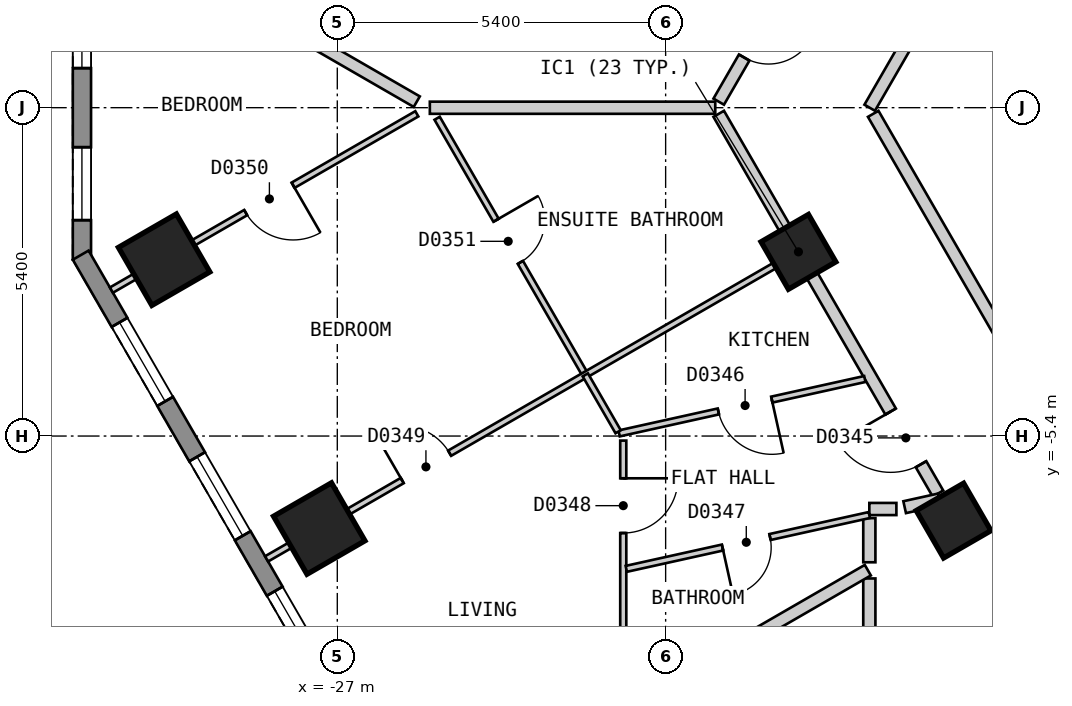
"""IFC4 building model, lengths in metres.
Left out: names, types, materials, properties, quantities, classifications, styles, units other than length and angle.
Written with IfcOpenShell. Run it as: python <this file> out.ifc"""

import sys

from ifc_helpers import new_model, si_unit, direction, frame, frame_2d, origin, origin_2d, place, context, subcontext, project, spatial, polyline, rectangle, outline, extrude, element, fill, save


model = new_model("IFC4")
c1 = context("Model", 3, precision=1e-05, world=origin(), true_north=direction((0.0, 1.0)))
c2 = subcontext(c1, "Body", "Model", "MODEL_VIEW")
j1 = project(units=[si_unit("LENGTHUNIT", "METRE"), si_unit("PLANEANGLEUNIT", "RADIAN")], contexts=[c1])
p1 = place(None, origin())
s1 = spatial("IfcSite", under=j1, at=p1, CompositionType="ELEMENT")
p2 = place(p1, origin())
s2 = spatial("IfcBuilding", under=s1, at=p2, CompositionType="ELEMENT")
p3 = place(p2, frame((0.0, 0.0, 59.4)))
s3 = spatial("IfcBuildingStorey", under=s2, at=p3, CompositionType="ELEMENT", Elevation=59.4)
for number, where, z_axis, x_axis in (
    (1, (-29.848, -2.5, 0.0), (0.0, 0.0, 1.0), (0.5, -0.866, 0.0)),
    (2, (-27.297, -6.921, 0.0), (0.0, 0.0, 1.0), (0.5, -0.866, 0.0)),
):
    element("IfcColumn", number, at=place(p3, frame(where, z_axis=z_axis, x_axis=x_axis)), inside=s3, PredefinedType="COLUMN", context=c2, shape_type="SweptSolid", body=[
        extrude(rectangle(XDim=1.1, YDim=1.1, at=origin_2d()), origin(), (0.0, 0.0, 1.0), 3.0),
    ])
for number, where, z_axis, x_axis in (
    (3, (-19.416, -2.371, 0.0), (0.0, 0.0, 1.0), (0.5, -0.866, 0.0)),
    (4, (-16.864, -6.791, 0.0), (0.0, 0.0, 1.0), (0.5, -0.866, 0.0)),
):
    element("IfcColumn", number, at=place(p3, frame(where, z_axis=z_axis, x_axis=x_axis)), inside=s3, PredefinedType="COLUMN", context=c2, shape_type="SweptSolid", body=[
        extrude(rectangle(XDim=0.9, YDim=0.9, at=origin_2d()), origin(), (0.0, 0.0, 1.0), 3.0),
    ])
p4 = place(p3, frame((-31.2, 2.5, 0.0), z_axis=(0.0, 0.0, 1.0), x_axis=(0.0, -1.0, 0.0)))
e5 = element("IfcWall", 5, at=p4, inside=s3, PredefinedType="SOLIDWALL", context=c2, shape_type="SweptSolid", body=[
    extrude(outline(polyline([(0.0, -0.15), (5.0, -0.15), (4.92, 0.15), (0.08, 0.15), (0.0, -0.15)])), origin(), (0.0, 0.0, 1.0), 2.6),
])
p5 = place(p4, frame((0.65, 0.0, 0.15)))
e6 = element("IfcOpeningElement", 6, at=p5, cuts=e5, PredefinedType="OPENING", context=c2, shape_type="SweptSolid", body=[
    extrude(rectangle(XDim=1.2, YDim=2.1, at=frame_2d((0.6, 1.05))), frame((0.0, 0.16, 0.0), z_axis=(0.0, -1.0, 0.0), x_axis=(1.0, 0.0, 0.0)), (0.0, 0.0, 1.0), 0.32),
])
p6 = place(p4, frame((3.15, 0.0, 0.15)))
e7 = element("IfcOpeningElement", 7, at=p6, cuts=e5, PredefinedType="OPENING", context=c2, shape_type="SweptSolid", body=[
    extrude(rectangle(XDim=1.2, YDim=2.1, at=frame_2d((0.6, 1.05))), frame((0.0, 0.16, 0.0), z_axis=(0.0, -1.0, 0.0), x_axis=(1.0, 0.0, 0.0)), (0.0, 0.0, 1.0), 0.32),
])
p7 = place(p3, frame((-31.22, -2.425, 0.0), z_axis=(0.0, 0.0, 1.0), x_axis=(0.500001938803, -0.866024284413, 0.0)))
e8 = element("IfcWall", 8, at=p7, inside=s3, PredefinedType="SOLIDWALL", context=c2, shape_type="SweptSolid", body=[
    extrude(outline(polyline([(0.0, -0.15), (27.02, -0.15), (26.94, 0.15), (0.08, 0.15), (0.0, -0.15)])), origin(), (0.0, 0.0, 1.0), 2.6),
])
p8 = place(p7, frame((1.277, 0.0, 0.15)))
e9 = element("IfcOpeningElement", 9, at=p8, cuts=e8, PredefinedType="OPENING", context=c2, shape_type="SweptSolid", body=[
    extrude(rectangle(XDim=1.5, YDim=2.1, at=frame_2d((0.75, 1.05))), frame((0.0, 0.16, 0.0), z_axis=(0.0, -1.0, 0.0), x_axis=(1.0, 0.0, 0.0)), (0.0, 0.0, 1.0), 0.32),
])
p9 = place(p7, frame((3.829, 0.0, 0.15)))
e10 = element("IfcOpeningElement", 10, at=p9, cuts=e8, PredefinedType="OPENING", context=c2, shape_type="SweptSolid", body=[
    extrude(rectangle(XDim=1.5, YDim=2.1, at=frame_2d((0.75, 1.05))), frame((0.0, 0.16, 0.0), z_axis=(0.0, -1.0, 0.0), x_axis=(1.0, 0.0, 0.0)), (0.0, 0.0, 1.0), 0.32),
])
p10 = place(p7, frame((6.382, 0.0, 0.15)))
e11 = element("IfcOpeningElement", 11, at=p10, cuts=e8, PredefinedType="OPENING", context=c2, shape_type="SweptSolid", body=[
    extrude(rectangle(XDim=1.5, YDim=2.1, at=frame_2d((0.75, 1.05))), frame((0.0, 0.16, 0.0), z_axis=(0.0, -1.0, 0.0), x_axis=(1.0, 0.0, 0.0)), (0.0, 0.0, 1.0), 0.32),
])
p11 = place(p7, frame((8.933, 0.0, 0.15)))
e12 = element("IfcOpeningElement", 12, at=p11, cuts=e8, PredefinedType="OPENING", context=c2, shape_type="SweptSolid", body=[
    extrude(rectangle(XDim=1.5, YDim=2.1, at=frame_2d((0.75, 1.05))), frame((0.0, 0.16, 0.0), z_axis=(0.0, -1.0, 0.0), x_axis=(1.0, 0.0, 0.0)), (0.0, 0.0, 1.0), 0.32),
])
p12 = place(p7, frame((11.485, 0.0, 0.15)))
e13 = element("IfcOpeningElement", 13, at=p12, cuts=e8, PredefinedType="OPENING", context=c2, shape_type="SweptSolid", body=[
    extrude(rectangle(XDim=1.5, YDim=2.1, at=frame_2d((0.75, 1.05))), frame((0.0, 0.16, 0.0), z_axis=(0.0, -1.0, 0.0), x_axis=(1.0, 0.0, 0.0)), (0.0, 0.0, 1.0), 0.32),
])
p13 = place(p7, frame((14.037, 0.0, 0.15)))
e14 = element("IfcOpeningElement", 14, at=p13, cuts=e8, PredefinedType="OPENING", context=c2, shape_type="SweptSolid", body=[
    extrude(rectangle(XDim=1.5, YDim=2.1, at=frame_2d((0.75, 1.05))), frame((0.0, 0.16, 0.0), z_axis=(0.0, -1.0, 0.0), x_axis=(1.0, 0.0, 0.0)), (0.0, 0.0, 1.0), 0.32),
])
p14 = place(p7, frame((16.589, 0.0, 0.15)))
e15 = element("IfcOpeningElement", 15, at=p14, cuts=e8, PredefinedType="OPENING", context=c2, shape_type="SweptSolid", body=[
    extrude(rectangle(XDim=1.5, YDim=2.1, at=frame_2d((0.75, 1.05))), frame((0.0, 0.16, 0.0), z_axis=(0.0, -1.0, 0.0), x_axis=(1.0, 0.0, 0.0)), (0.0, 0.0, 1.0), 0.32),
])
p15 = place(p7, frame((19.141, 0.0, 0.15)))
e16 = element("IfcOpeningElement", 16, at=p15, cuts=e8, PredefinedType="OPENING", context=c2, shape_type="SweptSolid", body=[
    extrude(rectangle(XDim=1.5, YDim=2.1, at=frame_2d((0.75, 1.05))), frame((0.0, 0.16, 0.0), z_axis=(0.0, -1.0, 0.0), x_axis=(1.0, 0.0, 0.0)), (0.0, 0.0, 1.0), 0.32),
])
p16 = place(p7, frame((21.693, 0.0, 0.15)))
e17 = element("IfcOpeningElement", 17, at=p16, cuts=e8, PredefinedType="OPENING", context=c2, shape_type="SweptSolid", body=[
    extrude(rectangle(XDim=1.5, YDim=2.1, at=frame_2d((0.75, 1.05))), frame((0.0, 0.16, 0.0), z_axis=(0.0, -1.0, 0.0), x_axis=(1.0, 0.0, 0.0)), (0.0, 0.0, 1.0), 0.32),
])
p17 = place(p7, frame((24.244, 0.0, 0.15)))
e18 = element("IfcOpeningElement", 18, at=p17, cuts=e8, PredefinedType="OPENING", context=c2, shape_type="SweptSolid", body=[
    extrude(rectangle(XDim=1.5, YDim=2.1, at=frame_2d((0.75, 1.05))), frame((0.0, 0.16, 0.0), z_axis=(0.0, -1.0, 0.0), x_axis=(1.0, 0.0, 0.0)), (0.0, 0.0, 1.0), 0.32),
])
p18 = place(p3, frame((-18.186, -0.101, 0.0), z_axis=(0.0, 0.0, 1.0), x_axis=(0.499997591167, -0.86602679452, 0.0)))
e19 = element("IfcWall", 19, at=p18, inside=s3, PredefinedType="PARTITIONING", context=c2, shape_type="SweptSolid", body=[
    extrude(rectangle(XDim=5.172, YDim=0.2, at=frame_2d((2.586, 0.0))), origin(), (0.0, 0.0, 1.0), 2.6),
])
p19 = place(p3, frame((-20.727, -0.101, 0.0), z_axis=(0.0, 0.0, 1.0), x_axis=(0.500049702773, -0.865996705973, 0.0)))
e20 = element("IfcWall", 20, at=p19, inside=s3, PredefinedType="PARTITIONING", context=c2, shape_type="SweptSolid", body=[
    extrude(rectangle(XDim=7.211, YDim=0.2, at=frame_2d((3.605, 0.0))), origin(), (0.0, 0.0, 1.0), 2.6),
])
p20 = place(p19, frame((5.654, 0.0, 0.0)))
e21 = element("IfcOpeningElement", 21, at=p20, cuts=e20, PredefinedType="OPENING", context=c2, shape_type="SweptSolid", body=[
    extrude(rectangle(XDim=1.0, YDim=2.1, at=frame_2d((0.5, 1.05))), frame((0.0, 0.11, 0.0), z_axis=(0.0, -1.0, 0.0), x_axis=(1.0, 0.0, 0.0)), (0.0, 0.0, 1.0), 0.22),
])
p21 = place(p3, frame((-18.25, -6.6, 0.0), z_axis=(0.0, 0.0, 1.0), x_axis=(1.0, 0.0, 0.0)))
e22 = element("IfcWall", 22, at=p21, inside=s3, PredefinedType="PARTITIONING", context=c2, shape_type="SweptSolid", body=[
    extrude(rectangle(XDim=0.445, YDim=0.2, at=frame_2d((0.223, 0.0))), origin(), (0.0, 0.0, 1.0), 2.6),
])
p22 = place(p3, frame((-18.244, -0.001, 0.0), z_axis=(0.0, 0.0, 1.0), x_axis=(0.499962999376, 0.866046765051, 0.0)))
e23 = element("IfcWall", 23, at=p22, inside=s3, PredefinedType="PARTITIONING", context=c2, shape_type="SweptSolid", body=[
    extrude(rectangle(XDim=18.245, YDim=0.2, at=frame_2d((9.123, 0.0))), origin(), (0.0, 0.0, 1.0), 2.6),
])
p23 = place(p22, frame((8.672, 0.0, 0.0)))
e24 = element("IfcOpeningElement", 24, at=p23, cuts=e23, PredefinedType="OPENING", context=c2, shape_type="SweptSolid", body=[
    extrude(rectangle(XDim=0.9, YDim=2.1, at=frame_2d((0.45, 1.05))), frame((0.0, 0.11, 0.0), z_axis=(0.0, -1.0, 0.0), x_axis=(1.0, 0.0, 0.0)), (0.0, 0.0, 1.0), 0.22),
])
p24 = place(p3, frame((-20.727, 0.099, 0.0), z_axis=(0.0, 0.0, 1.0), x_axis=(0.499993204491, 0.866029327138, 0.0)))
e25 = element("IfcWall", 25, at=p24, inside=s3, PredefinedType="PARTITIONING", context=c2, shape_type="SweptSolid", body=[
    extrude(rectangle(XDim=20.554, YDim=0.2, at=frame_2d((10.277, 0.0))), origin(), (0.0, 0.0, 1.0), 2.6),
])
p25 = place(p24, frame((14.88, 0.0, 0.0)))
e26 = element("IfcOpeningElement", 26, at=p25, cuts=e25, PredefinedType="OPENING", context=c2, shape_type="SweptSolid", body=[
    extrude(rectangle(XDim=1.0, YDim=2.1, at=frame_2d((0.5, 1.05))), frame((0.0, 0.11, 0.0), z_axis=(0.0, -1.0, 0.0), x_axis=(1.0, 0.0, 0.0)), (0.0, 0.0, 1.0), 0.22),
])
p26 = place(p24, frame((4.673, 0.0, 0.0)))
e27 = element("IfcOpeningElement", 27, at=p26, cuts=e25, PredefinedType="OPENING", context=c2, shape_type="SweptSolid", body=[
    extrude(rectangle(XDim=1.0, YDim=2.1, at=frame_2d((0.5, 1.05))), frame((0.0, 0.11, 0.0), z_axis=(0.0, -1.0, 0.0), x_axis=(1.0, 0.0, 0.0)), (0.0, 0.0, 1.0), 0.22),
])
p27 = place(p24, frame((0.838, 0.0, 0.0)))
e28 = element("IfcOpeningElement", 28, at=p27, cuts=e25, PredefinedType="OPENING", context=c2, shape_type="SweptSolid", body=[
    extrude(rectangle(XDim=0.8, YDim=2.1, at=frame_2d((0.4, 1.05))), frame((0.0, 0.11, 0.0), z_axis=(0.0, -1.0, 0.0), x_axis=(1.0, 0.0, 0.0)), (0.0, 0.0, 1.0), 0.22),
])
p28 = place(p3, frame((-18.25, -11.407, 0.0), z_axis=(0.0, 0.0, 1.0), x_axis=(0.0, 1.0, 0.0)))
e29 = element("IfcWall", 29, at=p28, inside=s3, PredefinedType="PARTITIONING", context=c2, shape_type="SweptSolid", body=[
    extrude(rectangle(XDim=3.665, YDim=0.2, at=frame_2d((1.833, 0.0))), origin(), (0.0, 0.0, 1.0), 2.6),
])
p29 = place(p28, frame((0.334, 0.0, 0.0)))
e30 = element("IfcOpeningElement", 30, at=p29, cuts=e29, PredefinedType="OPENING", context=c2, shape_type="SweptSolid", body=[
    extrude(rectangle(XDim=1.0, YDim=2.1, at=frame_2d((0.5, 1.05))), frame((0.0, 0.11, 0.0), z_axis=(0.0, -1.0, 0.0), x_axis=(1.0, 0.0, 0.0)), (0.0, 0.0, 1.0), 0.22),
])
p30 = place(p3, frame((-18.25, -7.476, 0.0), z_axis=(0.0, 0.0, 1.0), x_axis=(0.0, 1.0, 0.0)))
e31 = element("IfcWall", 31, at=p30, inside=s3, PredefinedType="PARTITIONING", context=c2, shape_type="SweptSolid", body=[
    extrude(rectangle(XDim=0.726, YDim=0.2, at=frame_2d((0.363, 0.0))), origin(), (0.0, 0.0, 1.0), 2.6),
])
p31 = place(p3, frame((-25.358, -0.174, 0.0), z_axis=(0.0, 0.0, 1.0), x_axis=(0.500093956194, -0.865971151354, 0.0)))
e32 = element("IfcWall", 32, at=p31, inside=s3, PredefinedType="PARTITIONING", context=c2, shape_type="SweptSolid", body=[
    extrude(rectangle(XDim=4.873, YDim=0.1, at=frame_2d((2.437, 0.0))), origin(), (0.0, 0.0, 1.0), 2.6),
])
p32 = place(p31, frame((1.937, 0.0, 0.0)))
e33 = element("IfcOpeningElement", 33, at=p32, cuts=e32, PredefinedType="OPENING", context=c2, shape_type="SweptSolid", body=[
    extrude(rectangle(XDim=0.8, YDim=2.1, at=frame_2d((0.4, 1.05))), frame((0.0, 0.06, 0.0), z_axis=(0.0, -1.0, 0.0), x_axis=(1.0, 0.0, 0.0)), (0.0, 0.0, 1.0), 0.12),
])
p33 = place(p3, frame((-22.297, -9.813, 0.0), z_axis=(0.0, 0.0, 1.0), x_axis=(0.0, 1.0, 0.0)))
e34 = element("IfcWall", 34, at=p33, inside=s3, PredefinedType="PARTITIONING", context=c2, shape_type="SweptSolid", body=[
    extrude(rectangle(XDim=4.338, YDim=0.1, at=frame_2d((2.169, 0.0))), origin(), (0.0, 0.0, 1.0), 2.6),
])
p34 = place(p33, frame((2.818, 0.0, 0.0)))
e35 = element("IfcOpeningElement", 35, at=p34, cuts=e34, PredefinedType="OPENING", context=c2, shape_type="SweptSolid", body=[
    extrude(rectangle(XDim=0.9, YDim=2.1, at=frame_2d((0.45, 1.05))), frame((0.0, 0.06, 0.0), z_axis=(0.0, -1.0, 0.0), x_axis=(1.0, 0.0, 0.0)), (0.0, 0.0, 1.0), 0.12),
])
p35 = place(p3, frame((-22.365, -5.357, 0.0), z_axis=(0.0, 0.0, 1.0), x_axis=(0.976339488582, 0.216243388421, 0.0)))
e36 = element("IfcWall", 36, at=p35, inside=s3, PredefinedType="PARTITIONING", context=c2, shape_type="SweptSolid", body=[
    extrude(rectangle(XDim=4.139, YDim=0.1, at=frame_2d((2.069, 0.0))), origin(), (0.0, 0.0, 1.0), 2.6),
])
p36 = place(p35, frame((1.672, 0.0, 0.0)))
e37 = element("IfcOpeningElement", 37, at=p36, cuts=e36, PredefinedType="OPENING", context=c2, shape_type="SweptSolid", body=[
    extrude(rectangle(XDim=0.9, YDim=2.1, at=frame_2d((0.45, 1.05))), frame((0.0, 0.06, 0.0), z_axis=(0.0, -1.0, 0.0), x_axis=(1.0, 0.0, 0.0)), (0.0, 0.0, 1.0), 0.12),
])
p37 = place(p3, frame((-22.247, -7.584, 0.0), z_axis=(0.0, 0.0, 1.0), x_axis=(0.97635375062, 0.216178985219, 0.0)))
e38 = element("IfcWall", 38, at=p37, inside=s3, PredefinedType="PARTITIONING", context=c2, shape_type="SweptSolid", body=[
    extrude(rectangle(XDim=4.094, YDim=0.1, at=frame_2d((2.047, 0.0))), origin(), (0.0, 0.0, 1.0), 2.6),
])
p38 = place(p37, frame((1.621, 0.0, 0.0)))
e39 = element("IfcOpeningElement", 39, at=p38, cuts=e38, PredefinedType="OPENING", context=c2, shape_type="SweptSolid", body=[
    extrude(rectangle(XDim=0.8, YDim=2.1, at=frame_2d((0.4, 1.05))), frame((0.0, 0.06, 0.0), z_axis=(0.0, -1.0, 0.0), x_axis=(1.0, 0.0, 0.0)), (0.0, 0.0, 1.0), 0.12),
])
p39 = place(p3, frame((-28.163, -7.42, 0.0), z_axis=(0.0, 0.0, 1.0), x_axis=(0.866065245018, 0.499930986609, 0.0)))
e40 = element("IfcWall", 40, at=p39, inside=s3, PredefinedType="PARTITIONING", context=c2, shape_type="SweptSolid", body=[
    extrude(rectangle(XDim=10.0, YDim=0.1, at=frame_2d((5.0, 0.0))), origin(), (0.0, 0.0, 1.0), 2.6),
])
p40 = place(p39, frame((2.576, 0.0, 0.0)))
e41 = element("IfcOpeningElement", 41, at=p40, cuts=e40, PredefinedType="OPENING", context=c2, shape_type="SweptSolid", body=[
    extrude(rectangle(XDim=0.9, YDim=2.1, at=frame_2d((0.45, 1.05))), frame((0.0, 0.06, 0.0), z_axis=(0.0, -1.0, 0.0), x_axis=(1.0, 0.0, 0.0)), (0.0, 0.0, 1.0), 0.12),
])
p41 = place(p3, frame((-30.715, -3.0, 0.0), z_axis=(0.0, 0.0, 1.0), x_axis=(0.866116197112, 0.49984270836, 0.0)))
e42 = element("IfcWall", 42, at=p41, inside=s3, PredefinedType="PARTITIONING", context=c2, shape_type="SweptSolid", body=[
    extrude(rectangle(XDim=5.8, YDim=0.1, at=frame_2d((2.9, 0.0))), origin(), (0.0, 0.0, 1.0), 2.6),
])
p42 = place(p41, frame((2.55, 0.0, 0.0)))
e43 = element("IfcOpeningElement", 43, at=p42, cuts=e42, PredefinedType="OPENING", context=c2, shape_type="SweptSolid", body=[
    extrude(rectangle(XDim=0.9, YDim=2.1, at=frame_2d((0.45, 1.05))), frame((0.0, 0.06, 0.0), z_axis=(0.0, -1.0, 0.0), x_axis=(1.0, 0.0, 0.0)), (0.0, 0.0, 1.0), 0.12),
])
p43 = place(p3, frame((-30.716, 2.999, 0.0), z_axis=(0.0, 0.0, 1.0), x_axis=(0.866032775405, -0.499987231761, 0.0)))
e44 = element("IfcWall", 44, at=p43, inside=s3, PredefinedType="PARTITIONING", context=c2, shape_type="SweptSolid", body=[
    extrude(rectangle(XDim=5.8, YDim=0.2, at=frame_2d((2.9, 0.0))), origin(), (0.0, 0.0, 1.0), 2.6),
])
p44 = place(p3, frame((-25.478, -0.001, 0.0), z_axis=(0.0, 0.0, 1.0), x_axis=(1.0, 0.0, 0.0)))
e45 = element("IfcWall", 45, at=p44, inside=s3, PredefinedType="PARTITIONING", context=c2, shape_type="SweptSolid", body=[
    extrude(rectangle(XDim=4.694, YDim=0.2, at=frame_2d((2.347, 0.0))), origin(), (0.0, 0.0, 1.0), 2.6),
])
p45 = place(p3, frame((-17.669, -6.57, 0.0), z_axis=(0.0, 0.0, 1.0), x_axis=(0.976422724526, 0.215867234728, 0.0)))
e46 = element("IfcWall", 46, at=p45, inside=s3, PredefinedType="PARTITIONING", context=c2, shape_type="SweptSolid", body=[
    extrude(rectangle(XDim=0.583, YDim=0.2, at=frame_2d((0.292, 0.0))), origin(), (0.0, 0.0, 1.0), 2.6),
])
p46 = place(p3, frame((-25.61, -11.841, 0.0), z_axis=(0.0, 0.0, 1.0), x_axis=(0.866019023803, 0.500011050288, 0.0)))
e47 = element("IfcWall", 47, at=p46, inside=s3, PredefinedType="PARTITIONING", context=c2, shape_type="SweptSolid", body=[
    extrude(rectangle(XDim=8.47, YDim=0.2, at=frame_2d((4.235, 0.0))), origin(), (0.0, 0.0, 1.0), 2.6),
])
p47 = place(p3, frame((-22.921, -4.394, 0.0), z_axis=(0.0, 0.0, 1.0), x_axis=(0.499565963512, -0.866275849889, 0.0)))
e48 = element("IfcWall", 48, at=p47, inside=s3, PredefinedType="PARTITIONING", context=c2, shape_type="SweptSolid", body=[
    extrude(rectangle(XDim=1.081, YDim=0.1, at=frame_2d((0.54, 0.0))), origin(), (0.0, 0.0, 1.0), 2.6),
])
p48 = place(p5, origin())
e49 = element("IfcWindow", 49, at=p48, inside=s3, PartitioningType="SINGLE_PANEL", PredefinedType="WINDOW", context=c2, shape_type="SweptSolid", body=[
    extrude(rectangle(XDim=1.2, YDim=2.1, at=frame_2d((0.6, 1.05))), frame((0.0, 0.03, 0.0), z_axis=(0.0, -1.0, 0.0), x_axis=(1.0, 0.0, 0.0)), (0.0, 0.0, 1.0), 0.06),
])
fill(e6, e49)
p49 = place(p6, origin())
e50 = element("IfcWindow", 50, at=p49, inside=s3, PartitioningType="SINGLE_PANEL", PredefinedType="WINDOW", context=c2, shape_type="SweptSolid", body=[
    extrude(rectangle(XDim=1.2, YDim=2.1, at=frame_2d((0.6, 1.05))), frame((0.0, 0.03, 0.0), z_axis=(0.0, -1.0, 0.0), x_axis=(1.0, 0.0, 0.0)), (0.0, 0.0, 1.0), 0.06),
])
fill(e7, e50)
p50 = place(p8, origin())
e51 = element("IfcWindow", 51, at=p50, inside=s3, PartitioningType="SINGLE_PANEL", PredefinedType="WINDOW", context=c2, shape_type="SweptSolid", body=[
    extrude(rectangle(XDim=1.5, YDim=2.1, at=frame_2d((0.75, 1.05))), frame((0.0, 0.03, 0.0), z_axis=(0.0, -1.0, 0.0), x_axis=(1.0, 0.0, 0.0)), (0.0, 0.0, 1.0), 0.06),
])
fill(e9, e51)
p51 = place(p9, origin())
e52 = element("IfcWindow", 52, at=p51, inside=s3, PartitioningType="SINGLE_PANEL", PredefinedType="WINDOW", context=c2, shape_type="SweptSolid", body=[
    extrude(rectangle(XDim=1.5, YDim=2.1, at=frame_2d((0.75, 1.05))), frame((0.0, 0.03, 0.0), z_axis=(0.0, -1.0, 0.0), x_axis=(1.0, 0.0, 0.0)), (0.0, 0.0, 1.0), 0.06),
])
fill(e10, e52)
p52 = place(p10, origin())
e53 = element("IfcWindow", 53, at=p52, inside=s3, PartitioningType="SINGLE_PANEL", PredefinedType="WINDOW", context=c2, shape_type="SweptSolid", body=[
    extrude(rectangle(XDim=1.5, YDim=2.1, at=frame_2d((0.75, 1.05))), frame((0.0, 0.03, 0.0), z_axis=(0.0, -1.0, 0.0), x_axis=(1.0, 0.0, 0.0)), (0.0, 0.0, 1.0), 0.06),
])
fill(e11, e53)
p53 = place(p27, origin())
e54 = element("IfcDoor", 54, at=p53, inside=s3, OperationType="SINGLE_SWING_RIGHT", PredefinedType="DOOR", context=c2, shape_type="SweptSolid", body=[
    extrude(rectangle(XDim=0.8, YDim=2.1, at=frame_2d((0.4, 1.05))), frame((0.0, 0.025, 0.0), z_axis=(0.0, -1.0, 0.0), x_axis=(1.0, 0.0, 0.0)), (0.0, 0.0, 1.0), 0.05),
])
fill(e28, e54)
p54 = place(p20, origin())
e55 = element("IfcDoor", 55, at=p54, inside=s3, OperationType="SINGLE_SWING_LEFT", PredefinedType="DOOR", context=c2, shape_type="SweptSolid", body=[
    extrude(rectangle(XDim=1.0, YDim=2.1, at=frame_2d((0.5, 1.05))), frame((0.0, 0.025, 0.0), z_axis=(0.0, -1.0, 0.0), x_axis=(1.0, 0.0, 0.0)), (0.0, 0.0, 1.0), 0.05),
])
fill(e21, e55)
p55 = place(p36, origin())
e56 = element("IfcDoor", 56, at=p55, inside=s3, OperationType="SINGLE_SWING_RIGHT", PredefinedType="DOOR", context=c2, shape_type="SweptSolid", body=[
    extrude(rectangle(XDim=0.9, YDim=2.1, at=frame_2d((0.45, 1.05))), frame((0.0, 0.025, 0.0), z_axis=(0.0, -1.0, 0.0), x_axis=(1.0, 0.0, 0.0)), (0.0, 0.0, 1.0), 0.05),
])
fill(e37, e56)
p56 = place(p38, origin())
e57 = element("IfcDoor", 57, at=p56, inside=s3, OperationType="SINGLE_SWING_LEFT", PredefinedType="DOOR", context=c2, shape_type="SweptSolid", body=[
    extrude(rectangle(XDim=0.8, YDim=2.1, at=frame_2d((0.4, 1.05))), frame((0.0, 0.025, 0.0), z_axis=(0.0, -1.0, 0.0), x_axis=(1.0, 0.0, 0.0)), (0.0, 0.0, 1.0), 0.05),
])
fill(e39, e57)
p57 = place(p34, origin())
e58 = element("IfcDoor", 58, at=p57, inside=s3, OperationType="SINGLE_SWING_RIGHT", PredefinedType="DOOR", context=c2, shape_type="SweptSolid", body=[
    extrude(rectangle(XDim=0.9, YDim=2.1, at=frame_2d((0.45, 1.05))), frame((0.0, 0.025, 0.0), z_axis=(0.0, -1.0, 0.0), x_axis=(1.0, 0.0, 0.0)), (0.0, 0.0, 1.0), 0.05),
])
fill(e35, e58)
p58 = place(p40, origin())
e59 = element("IfcDoor", 59, at=p58, inside=s3, OperationType="SINGLE_SWING_LEFT", PredefinedType="DOOR", context=c2, shape_type="SweptSolid", body=[
    extrude(rectangle(XDim=0.9, YDim=2.1, at=frame_2d((0.45, 1.05))), frame((0.0, 0.025, 0.0), z_axis=(0.0, -1.0, 0.0), x_axis=(1.0, 0.0, 0.0)), (0.0, 0.0, 1.0), 0.05),
])
fill(e41, e59)
p59 = place(p42, origin())
e60 = element("IfcDoor", 60, at=p59, inside=s3, OperationType="SINGLE_SWING_RIGHT", PredefinedType="DOOR", context=c2, shape_type="SweptSolid", body=[
    extrude(rectangle(XDim=0.9, YDim=2.1, at=frame_2d((0.45, 1.05))), frame((0.0, 0.025, 0.0), z_axis=(0.0, -1.0, 0.0), x_axis=(1.0, 0.0, 0.0)), (0.0, 0.0, 1.0), 0.05),
])
fill(e43, e60)
p60 = place(p32, origin())
e61 = element("IfcDoor", 61, at=p60, inside=s3, OperationType="SINGLE_SWING_LEFT", PredefinedType="DOOR", context=c2, shape_type="SweptSolid", body=[
    extrude(rectangle(XDim=0.8, YDim=2.1, at=frame_2d((0.4, 1.05))), frame((0.0, 0.025, 0.0), z_axis=(0.0, -1.0, 0.0), x_axis=(1.0, 0.0, 0.0)), (0.0, 0.0, 1.0), 0.05),
])
fill(e33, e61)
save(model, sys.argv[1])
